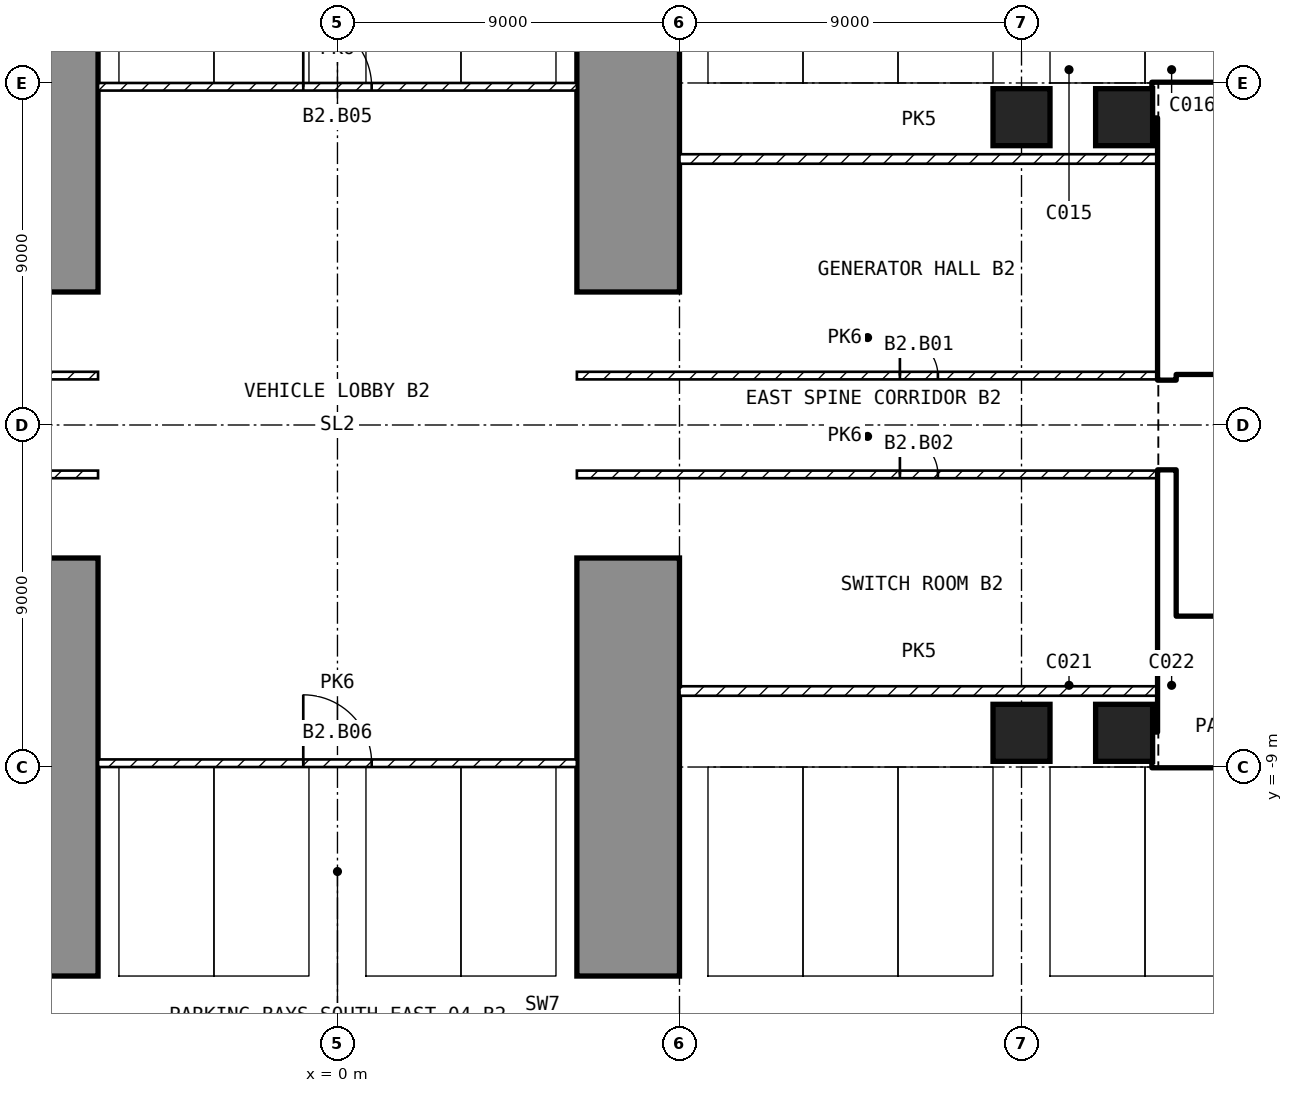
"""IFC4 building model, lengths in metres.
Left out: names, types, materials, properties, quantities, classifications, styles, units other than length and angle.
Written with IfcOpenShell. Run it as: python <this file> out.ifc"""

import sys

from ifc_helpers import new_model, si_unit, direction, frame, frame_2d, origin, origin_2d, place, context, subcontext, project, spatial, polyline, rectangle, outline, extrude, element, fill, save


model = new_model("IFC4")
c1 = context("Model", 3, precision=1e-05, world=origin(), true_north=direction((0.0, 1.0)))
c2 = subcontext(c1, "Body", "Model", "MODEL_VIEW")
j1 = project(units=[si_unit("LENGTHUNIT", "METRE"), si_unit("PLANEANGLEUNIT", "RADIAN")], contexts=[c1])
p1 = place(None, origin())
s1 = spatial("IfcSite", under=j1, at=p1, CompositionType="ELEMENT")
p2 = place(p1, origin())
s2 = spatial("IfcBuilding", under=s1, at=p2, CompositionType="ELEMENT")
p3 = place(p2, frame((0.0, 0.0, -8.7)))
s3 = spatial("IfcBuildingStorey", under=s2, at=p3, CompositionType="ELEMENT", Elevation=-8.7)
for number, where, z_axis, x_axis in (
    (1, (18.0, -8.1, -0.3), (0.0, 0.0, 1.0), (1.0, 0.0, 0.0)),
    (2, (18.0, 8.1, -0.3), (0.0, 0.0, 1.0), (1.0, 0.0, 0.0)),
    (3, (20.7, -8.1, -0.3), (0.0, 0.0, 1.0), (1.0, 0.0, 0.0)),
    (4, (20.7, 8.1, -0.3), (0.0, 0.0, 1.0), (1.0, 0.0, 0.0)),
):
    element("IfcColumn", number, at=place(p3, frame(where, z_axis=z_axis, x_axis=x_axis)), inside=s3, PredefinedType="COLUMN", context=c2, shape_type="SweptSolid", body=[
        extrude(rectangle(XDim=1.5, YDim=1.5, at=origin_2d()), origin(), (0.0, 0.0, 1.0), 4.2),
    ])
p4 = place(p3, frame((6.3, -27.0, -0.3), z_axis=(1.0, 0.0, 0.0), x_axis=(0.0, 1.0, 0.0)))
e5 = element("IfcWall", 5, at=p4, inside=s3, PredefinedType="SOLIDWALL", context=c2, shape_type="SweptSolid", body=[
    extrude(outline(polyline([(0.0, 0.0), (5.5, 0.0), (5.5, 3.3), (12.5, 3.3), (12.5, 0.0), (23.5, 0.0), (23.5, 4.2), (0.0, 4.2), (0.0, 0.0)])), origin(), (0.0, 0.0, 1.0), 2.7),
])
p5 = place(p3, frame((6.3, 3.5, -0.3), z_axis=(1.0, 0.0, 0.0), x_axis=(0.0, 1.0, 0.0)))
e6 = element("IfcWall", 6, at=p5, inside=s3, PredefinedType="SOLIDWALL", context=c2, shape_type="SweptSolid", body=[
    extrude(outline(polyline([(0.0, 0.0), (11.0, 0.0), (11.0, 3.3), (18.0, 3.3), (18.0, 0.0), (23.5, 0.0), (23.5, 4.2), (0.0, 4.2), (0.0, 0.0)])), origin(), (0.0, 0.0, 1.0), 2.7),
])
p6 = place(p3, frame((-9.0, -27.0, -0.3), z_axis=(1.0, 0.0, 0.0), x_axis=(0.0, 1.0, 0.0)))
e7 = element("IfcWall", 7, at=p6, inside=s3, PredefinedType="SOLIDWALL", context=c2, shape_type="SweptSolid", body=[
    extrude(outline(polyline([(0.0, 0.0), (5.5, 0.0), (5.5, 3.3), (12.5, 3.3), (12.5, 0.0), (23.5, 0.0), (23.5, 4.2), (0.0, 4.2), (0.0, 0.0)])), origin(), (0.0, 0.0, 1.0), 2.7),
])
p7 = place(p3, frame((-9.0, 3.5, -0.3), z_axis=(1.0, 0.0, 0.0), x_axis=(0.0, 1.0, 0.0)))
e8 = element("IfcWall", 8, at=p7, inside=s3, PredefinedType="SOLIDWALL", context=c2, shape_type="SweptSolid", body=[
    extrude(outline(polyline([(0.0, 0.0), (11.0, 0.0), (11.0, 3.3), (18.0, 3.3), (18.0, 0.0), (23.5, 0.0), (23.5, 4.2), (0.0, 4.2), (0.0, 0.0)])), origin(), (0.0, 0.0, 1.0), 2.7),
])
p8 = place(p3, frame((21.45, -8.55, 0.0), z_axis=(0.0, 0.0, 1.0), x_axis=(1.0, 0.0, 0.0)))
e9 = element("IfcWall", 9, at=p8, inside=s3, PredefinedType="SHEAR", context=c2, shape_type="SweptSolid", body=[
    extrude(rectangle(XDim=10.95, YDim=0.9, at=frame_2d((5.475, 0.0))), origin(), (0.0, 0.0, 1.0), 3.9),
])
p9 = place(p3, frame((21.45, 8.55, 0.0), z_axis=(0.0, 0.0, 1.0), x_axis=(1.0, 0.0, 0.0)))
e10 = element("IfcWall", 10, at=p9, inside=s3, PredefinedType="SHEAR", context=c2, shape_type="SweptSolid", body=[
    extrude(rectangle(XDim=10.05, YDim=0.9, at=frame_2d((5.025, 0.0))), origin(), (0.0, 0.0, 1.0), 3.9),
])
for number, where, z_axis, x_axis in (
    (11, (21.825, -8.1, 0.0), (0.0, 0.0, 1.0), (0.0, 1.0, 0.0)),
    (12, (21.825, 1.2, 0.0), (0.0, 0.0, 1.0), (0.0, 1.0, 0.0)),
):
    element("IfcWall", number, at=place(p3, frame(where, z_axis=z_axis, x_axis=x_axis)), inside=s3, PredefinedType="SHEAR", context=c2, shape_type="SweptSolid", body=[
        extrude(rectangle(XDim=6.9, YDim=0.45, at=frame_2d((3.45, 0.0))), origin(), (0.0, 0.0, 1.0), 3.9),
    ])
p10 = place(p3, frame((22.05, 1.45, 0.0), z_axis=(0.0, 0.0, 1.0), x_axis=(1.0, 0.0, 0.0)))
e13 = element("IfcWall", 13, at=p10, inside=s3, PredefinedType="SOLIDWALL", context=c2, shape_type="SweptSolid", body=[
    extrude(rectangle(XDim=13.05, YDim=0.2, at=frame_2d((6.525, 0.0))), origin(), (0.0, 0.0, 1.0), 3.9),
])
p11 = place(p10, frame((0.75, 0.0, 0.0)))
e14 = element("IfcOpeningElement", 14, at=p11, cuts=e13, PredefinedType="OPENING", context=c2, shape_type="SweptSolid", body=[
    extrude(rectangle(XDim=1.0, YDim=2.1, at=frame_2d((0.5, 1.05))), frame((0.0, 0.11, 0.0), z_axis=(0.0, -1.0, 0.0), x_axis=(1.0, 0.0, 0.0)), (0.0, 0.0, 1.0), 0.22),
])
p12 = place(p10, frame((3.25, 0.0, 0.0)))
e15 = element("IfcOpeningElement", 15, at=p12, cuts=e13, PredefinedType="OPENING", context=c2, shape_type="SweptSolid", body=[
    extrude(rectangle(XDim=1.0, YDim=2.1, at=frame_2d((0.5, 1.05))), frame((0.0, 0.11, 0.0), z_axis=(0.0, -1.0, 0.0), x_axis=(1.0, 0.0, 0.0)), (0.0, 0.0, 1.0), 0.22),
])
p13 = place(p10, frame((10.0, 0.0, 0.0)))
e16 = element("IfcOpeningElement", 16, at=p13, cuts=e13, PredefinedType="OPENING", context=c2, shape_type="SweptSolid", body=[
    extrude(rectangle(XDim=0.9, YDim=2.1, at=frame_2d((0.45, 1.05))), frame((0.0, 0.11, 0.0), z_axis=(0.0, -1.0, 0.0), x_axis=(1.0, 0.0, 0.0)), (0.0, 0.0, 1.0), 0.22),
])
p14 = place(p3, frame((22.05, 5.15, 0.0), z_axis=(0.0, 0.0, 1.0), x_axis=(1.0, 0.0, 0.0)))
e17 = element("IfcWall", 17, at=p14, inside=s3, PredefinedType="SOLIDWALL", context=c2, shape_type="SweptSolid", body=[
    extrude(rectangle(XDim=6.3, YDim=0.2, at=frame_2d((3.15, 0.0))), origin(), (0.0, 0.0, 1.0), 3.9),
])
p15 = place(p14, frame((0.2, 0.0, 0.0)))
e18 = element("IfcOpeningElement", 18, at=p15, cuts=e17, PredefinedType="OPENING", context=c2, shape_type="SweptSolid", body=[
    extrude(rectangle(XDim=1.0, YDim=2.1, at=frame_2d((0.5, 1.05))), frame((0.0, 0.11, 0.0), z_axis=(0.0, -1.0, 0.0), x_axis=(1.0, 0.0, 0.0)), (0.0, 0.0, 1.0), 0.22),
])
p16 = place(p3, frame((22.05, -5.15, 0.0), z_axis=(0.0, 0.0, 1.0), x_axis=(1.0, 0.0, 0.0)))
e19 = element("IfcWall", 19, at=p16, inside=s3, PredefinedType="SOLIDWALL", context=c2, shape_type="SweptSolid", body=[
    extrude(rectangle(XDim=6.3, YDim=0.2, at=frame_2d((3.15, 0.0))), origin(), (0.0, 0.0, 1.0), 3.9),
])
p17 = place(p16, frame((0.2, 0.0, 0.0)))
e20 = element("IfcOpeningElement", 20, at=p17, cuts=e19, PredefinedType="OPENING", context=c2, shape_type="SweptSolid", body=[
    extrude(rectangle(XDim=1.0, YDim=2.1, at=frame_2d((0.5, 1.05))), frame((0.0, 0.11, 0.0), z_axis=(0.0, -1.0, 0.0), x_axis=(1.0, 0.0, 0.0)), (0.0, 0.0, 1.0), 0.22),
])
p18 = place(p3, frame((6.3, 1.3, 0.0), z_axis=(0.0, 0.0, 1.0), x_axis=(1.0, 0.0, 0.0)))
e21 = element("IfcWall", 21, at=p18, inside=s3, PredefinedType="PARTITIONING", context=c2, shape_type="SweptSolid", body=[
    extrude(rectangle(XDim=15.3, YDim=0.2, at=frame_2d((7.65, 0.0))), origin(), (0.0, 0.0, 1.0), 3.9),
])
p19 = place(p18, frame((8.5, 0.0, 0.0)))
e22 = element("IfcOpeningElement", 22, at=p19, cuts=e21, PredefinedType="OPENING", context=c2, shape_type="SweptSolid", body=[
    extrude(rectangle(XDim=1.0, YDim=2.1, at=frame_2d((0.5, 1.05))), frame((0.0, 0.11, 0.0), z_axis=(0.0, -1.0, 0.0), x_axis=(1.0, 0.0, 0.0)), (0.0, 0.0, 1.0), 0.22),
])
p20 = place(p3, frame((9.0, 7.0, 0.0), z_axis=(0.0, 0.0, 1.0), x_axis=(1.0, 0.0, 0.0)))
e23 = element("IfcWall", 23, at=p20, inside=s3, PredefinedType="SOLIDWALL", context=c2, shape_type="SweptSolid", body=[
    extrude(rectangle(XDim=12.6, YDim=0.25, at=frame_2d((6.3, 0.0))), origin(), (0.0, 0.0, 1.0), 3.9),
])
p21 = place(p3, frame((6.3, -1.3, 0.0), z_axis=(0.0, 0.0, 1.0), x_axis=(1.0, 0.0, 0.0)))
e24 = element("IfcWall", 24, at=p21, inside=s3, PredefinedType="PARTITIONING", context=c2, shape_type="SweptSolid", body=[
    extrude(rectangle(XDim=15.3, YDim=0.2, at=frame_2d((7.65, 0.0))), origin(), (0.0, 0.0, 1.0), 3.9),
])
p22 = place(p21, frame((8.5, 0.0, 0.0)))
e25 = element("IfcOpeningElement", 25, at=p22, cuts=e24, PredefinedType="OPENING", context=c2, shape_type="SweptSolid", body=[
    extrude(rectangle(XDim=1.0, YDim=2.1, at=frame_2d((0.5, 1.05))), frame((0.0, 0.11, 0.0), z_axis=(0.0, -1.0, 0.0), x_axis=(1.0, 0.0, 0.0)), (0.0, 0.0, 1.0), 0.22),
])
p23 = place(p3, frame((9.0, -7.0, 0.0), z_axis=(0.0, 0.0, 1.0), x_axis=(1.0, 0.0, 0.0)))
e26 = element("IfcWall", 26, at=p23, inside=s3, PredefinedType="SOLIDWALL", context=c2, shape_type="SweptSolid", body=[
    extrude(rectangle(XDim=12.6, YDim=0.25, at=frame_2d((6.3, 0.0))), origin(), (0.0, 0.0, 1.0), 3.9),
])
p24 = place(p3, frame((-6.3, 1.3, 0.0), z_axis=(0.0, 0.0, 1.0), x_axis=(-1.0, 0.0, 0.0)))
e27 = element("IfcWall", 27, at=p24, inside=s3, PredefinedType="PARTITIONING", context=c2, shape_type="SweptSolid", body=[
    extrude(rectangle(XDim=15.3, YDim=0.2, at=frame_2d((7.65, 0.0))), origin(), (0.0, 0.0, 1.0), 3.9),
])
p25 = place(p24, frame((8.5, 0.0, 0.0)))
e28 = element("IfcOpeningElement", 28, at=p25, cuts=e27, PredefinedType="OPENING", context=c2, shape_type="SweptSolid", body=[
    extrude(rectangle(XDim=1.0, YDim=2.1, at=frame_2d((0.5, 1.05))), frame((0.0, 0.11, 0.0), z_axis=(0.0, -1.0, 0.0), x_axis=(1.0, 0.0, 0.0)), (0.0, 0.0, 1.0), 0.22),
])
p26 = place(p3, frame((-6.3, -1.3, 0.0), z_axis=(0.0, 0.0, 1.0), x_axis=(-1.0, 0.0, 0.0)))
e29 = element("IfcWall", 29, at=p26, inside=s3, PredefinedType="PARTITIONING", context=c2, shape_type="SweptSolid", body=[
    extrude(rectangle(XDim=15.3, YDim=0.2, at=frame_2d((7.65, 0.0))), origin(), (0.0, 0.0, 1.0), 3.9),
])
p27 = place(p26, frame((8.5, 0.0, 0.0)))
e30 = element("IfcOpeningElement", 30, at=p27, cuts=e29, PredefinedType="OPENING", context=c2, shape_type="SweptSolid", body=[
    extrude(rectangle(XDim=1.0, YDim=2.1, at=frame_2d((0.5, 1.05))), frame((0.0, 0.11, 0.0), z_axis=(0.0, -1.0, 0.0), x_axis=(1.0, 0.0, 0.0)), (0.0, 0.0, 1.0), 0.22),
])
p28 = place(p3, frame((-6.3, 8.9, 0.0), z_axis=(0.0, 0.0, 1.0), x_axis=(1.0, 0.0, 0.0)))
e31 = element("IfcWall", 31, at=p28, inside=s3, PredefinedType="PARTITIONING", context=c2, shape_type="SweptSolid", body=[
    extrude(rectangle(XDim=12.6, YDim=0.2, at=frame_2d((6.3, 0.0))), origin(), (0.0, 0.0, 1.0), 3.9),
])
p29 = place(p28, frame((5.4, 0.0, 0.0)))
e32 = element("IfcOpeningElement", 32, at=p29, cuts=e31, PredefinedType="OPENING", context=c2, shape_type="SweptSolid", body=[
    extrude(rectangle(XDim=1.8, YDim=2.1, at=frame_2d((0.9, 1.05))), frame((0.0, 0.11, 0.0), z_axis=(0.0, -1.0, 0.0), x_axis=(1.0, 0.0, 0.0)), (0.0, 0.0, 1.0), 0.22),
])
p30 = place(p3, frame((-6.3, -8.9, 0.0), z_axis=(0.0, 0.0, 1.0), x_axis=(1.0, 0.0, 0.0)))
e33 = element("IfcWall", 33, at=p30, inside=s3, PredefinedType="PARTITIONING", context=c2, shape_type="SweptSolid", body=[
    extrude(rectangle(XDim=12.6, YDim=0.2, at=frame_2d((6.3, 0.0))), origin(), (0.0, 0.0, 1.0), 3.9),
])
p31 = place(p30, frame((5.4, 0.0, 0.0)))
e34 = element("IfcOpeningElement", 34, at=p31, cuts=e33, PredefinedType="OPENING", context=c2, shape_type="SweptSolid", body=[
    extrude(rectangle(XDim=1.8, YDim=2.1, at=frame_2d((0.9, 1.05))), frame((0.0, 0.11, 0.0), z_axis=(0.0, -1.0, 0.0), x_axis=(1.0, 0.0, 0.0)), (0.0, 0.0, 1.0), 0.22),
])
p32 = place(p17, origin())
e35 = element("IfcDoor", 35, at=p32, inside=s3, OperationType="SINGLE_SWING_LEFT", PredefinedType="DOOR", context=c2, shape_type="SweptSolid", body=[
    extrude(rectangle(XDim=1.0, YDim=2.1, at=frame_2d((0.5, 1.05))), frame((0.0, 0.025, 0.0), z_axis=(0.0, -1.0, 0.0), x_axis=(1.0, 0.0, 0.0)), (0.0, 0.0, 1.0), 0.05),
])
fill(e20, e35)
p33 = place(p15, origin())
e36 = element("IfcDoor", 36, at=p33, inside=s3, OperationType="SINGLE_SWING_LEFT", PredefinedType="DOOR", context=c2, shape_type="SweptSolid", body=[
    extrude(rectangle(XDim=1.0, YDim=2.1, at=frame_2d((0.5, 1.05))), frame((0.0, 0.025, 0.0), z_axis=(0.0, -1.0, 0.0), x_axis=(1.0, 0.0, 0.0)), (0.0, 0.0, 1.0), 0.05),
])
fill(e18, e36)
p34 = place(p11, origin())
e37 = element("IfcDoor", 37, at=p34, inside=s3, OperationType="SINGLE_SWING_LEFT", PredefinedType="DOOR", context=c2, shape_type="SweptSolid", body=[
    extrude(rectangle(XDim=1.0, YDim=2.1, at=frame_2d((0.5, 1.05))), frame((0.0, 0.025, 0.0), z_axis=(0.0, -1.0, 0.0), x_axis=(1.0, 0.0, 0.0)), (0.0, 0.0, 1.0), 0.05),
])
fill(e14, e37)
p35 = place(p19, origin())
e38 = element("IfcDoor", 38, at=p35, inside=s3, OperationType="SINGLE_SWING_LEFT", PredefinedType="DOOR", context=c2, shape_type="SweptSolid", body=[
    extrude(rectangle(XDim=1.0, YDim=2.1, at=frame_2d((0.5, 1.05))), frame((0.0, 0.025, 0.0), z_axis=(0.0, -1.0, 0.0), x_axis=(1.0, 0.0, 0.0)), (0.0, 0.0, 1.0), 0.05),
])
fill(e22, e38)
p36 = place(p22, origin())
e39 = element("IfcDoor", 39, at=p36, inside=s3, OperationType="SINGLE_SWING_LEFT", PredefinedType="DOOR", context=c2, shape_type="SweptSolid", body=[
    extrude(rectangle(XDim=1.0, YDim=2.1, at=frame_2d((0.5, 1.05))), frame((0.0, 0.025, 0.0), z_axis=(0.0, -1.0, 0.0), x_axis=(1.0, 0.0, 0.0)), (0.0, 0.0, 1.0), 0.05),
])
fill(e25, e39)
p37 = place(p29, origin())
e40 = element("IfcDoor", 40, at=p37, inside=s3, OperationType="SINGLE_SWING_LEFT", PredefinedType="DOOR", context=c2, shape_type="SweptSolid", body=[
    extrude(rectangle(XDim=1.8, YDim=2.1, at=frame_2d((0.9, 1.05))), frame((0.0, 0.025, 0.0), z_axis=(0.0, -1.0, 0.0), x_axis=(1.0, 0.0, 0.0)), (0.0, 0.0, 1.0), 0.05),
])
fill(e32, e40)
p38 = place(p31, origin())
e41 = element("IfcDoor", 41, at=p38, inside=s3, OperationType="SINGLE_SWING_LEFT", PredefinedType="DOOR", context=c2, shape_type="SweptSolid", body=[
    extrude(rectangle(XDim=1.8, YDim=2.1, at=frame_2d((0.9, 1.05))), frame((0.0, 0.025, 0.0), z_axis=(0.0, -1.0, 0.0), x_axis=(1.0, 0.0, 0.0)), (0.0, 0.0, 1.0), 0.05),
])
fill(e34, e41)
save(model, sys.argv[1])
